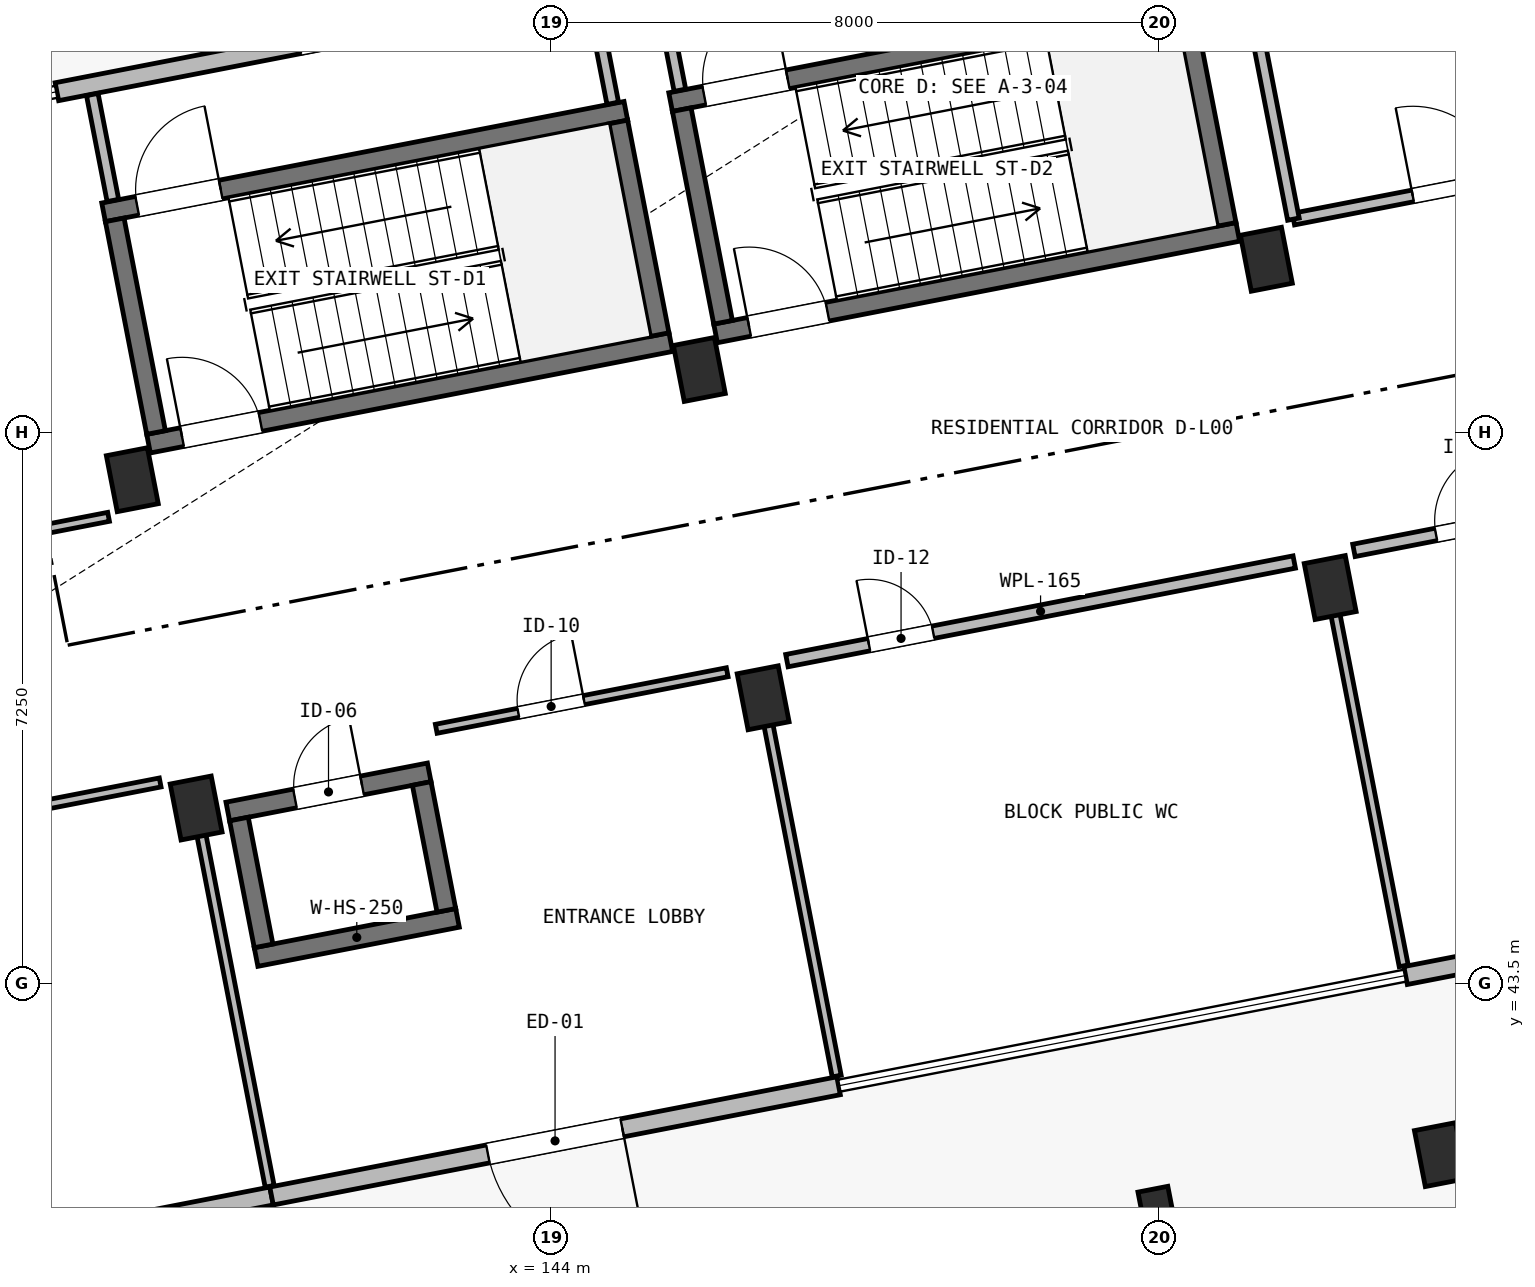
"""IFC4 building model, lengths in metres.
Left out: names, types, materials, properties, quantities, classifications, styles, units other than length and angle.
Written with IfcOpenShell. Run it as: python <this file> out.ifc"""

import sys

from ifc_helpers import new_model, si_unit, direction, frame, frame_2d, origin, origin_2d, place, context, subcontext, project, spatial, rectangle, extrude, element, fill, save


model = new_model("IFC4")
c1 = context("Model", 3, precision=1e-05, world=origin(), true_north=direction((0.0, 1.0)))
c2 = subcontext(c1, "Body", "Model", "MODEL_VIEW")
j1 = project(units=[si_unit("LENGTHUNIT", "METRE"), si_unit("PLANEANGLEUNIT", "RADIAN")], contexts=[c1])
p1 = place(None, origin())
s1 = spatial("IfcSite", under=j1, at=p1, CompositionType="ELEMENT")
p2 = place(p1, origin())
s2 = spatial("IfcBuilding", under=s1, at=p2, CompositionType="ELEMENT")
p3 = place(p2, origin())
s3 = spatial("IfcBuildingStorey", under=s2, at=p3, CompositionType="ELEMENT", Elevation=0.0)
for number, where, z_axis, x_axis in (
    (1, (139.331, 45.811, -0.35), (0.0, 0.0, 1.0), (0.982, 0.191, 0.0)),
    (2, (138.491, 50.13, -0.35), (0.0, 0.0, 1.0), (0.982, 0.191, 0.0)),
    (3, (146.791, 47.261, -0.35), (0.0, 0.0, 1.0), (0.982, 0.191, 0.0)),
    (4, (145.952, 51.58, -0.35), (0.0, 0.0, 1.0), (0.982, 0.191, 0.0)),
    (5, (155.702, 41.251, -0.35), (0.0, 0.0, 1.0), (0.982, 0.191, 0.0)),
    (6, (154.252, 48.711, -0.35), (0.0, 0.0, 1.0), (0.982, 0.191, 0.0)),
    (7, (153.412, 53.03, -0.35), (0.0, 0.0, 1.0), (0.982, 0.191, 0.0)),
):
    element("IfcColumn", number, at=place(p3, frame(where, z_axis=z_axis, x_axis=x_axis)), inside=s3, PredefinedType="COLUMN", context=c2, shape_type="SweptSolid", body=[
        extrude(rectangle(XDim=0.55, YDim=0.75, at=origin_2d()), origin(), (0.0, 0.0, 1.0), 4.85),
    ])
p4 = place(p3, frame((151.972, 40.526, -0.35), z_axis=(0.0, 0.0, 1.0), x_axis=(0.981627183448, 0.190808995377, 0.0)))
e8 = element("IfcColumn", 8, at=p4, inside=s3, PredefinedType="PILASTER", context=c2, shape_type="SweptSolid", body=[
    extrude(rectangle(XDim=0.4, YDim=0.55, at=origin_2d()), origin(), (0.0, 0.0, 1.0), 3.7),
])
p5 = place(p3, frame((138.113, 53.647, -0.35), z_axis=(0.0, 0.0, 1.0), x_axis=(0.981626097708, 0.19081458094, 0.0)))
e9 = element("IfcWall", 9, at=p5, inside=s3, PredefinedType="SHEAR", context=c2, shape_type="SweptSolid", body=[
    extrude(rectangle(XDim=7.0, YDim=0.25, at=frame_2d((3.5, 0.0))), origin(), (0.0, 0.0, 1.0), 4.85),
])
p6 = place(p5, frame((0.45, 0.0, 0.35)))
e10 = element("IfcOpeningElement", 10, at=p6, cuts=e9, PredefinedType="OPENING", context=c2, shape_type="SweptSolid", body=[
    extrude(rectangle(XDim=1.12, YDim=2.15, at=frame_2d((0.56, 1.075))), frame((0.0, 0.14, 0.0), z_axis=(0.0, -1.0, 0.0), x_axis=(1.0, 0.0, 0.0)), (0.0, 0.0, 1.0), 0.28),
])
p7 = place(p3, frame((138.705, 50.604, -0.35), z_axis=(0.0, 0.0, 1.0), x_axis=(0.981626097708, 0.19081458094, 0.0)))
e11 = element("IfcWall", 11, at=p7, inside=s3, PredefinedType="SHEAR", context=c2, shape_type="SweptSolid", body=[
    extrude(rectangle(XDim=7.0, YDim=0.25, at=frame_2d((3.5, 0.0))), origin(), (0.0, 0.0, 1.0), 4.85),
])
p8 = place(p7, frame((0.45, 0.0, 0.35)))
e12 = element("IfcOpeningElement", 12, at=p8, cuts=e11, PredefinedType="OPENING", context=c2, shape_type="SweptSolid", body=[
    extrude(rectangle(XDim=1.05, YDim=2.15, at=frame_2d((0.525, 1.075))), frame((0.0, 0.14, 0.0), z_axis=(0.0, -1.0, 0.0), x_axis=(1.0, 0.0, 0.0)), (0.0, 0.0, 1.0), 0.28),
])
p9 = place(p3, frame((138.804, 50.751, -0.35), z_axis=(0.0, 0.0, 1.0), x_axis=(-0.190858194834, 0.981617618762, 0.0)))
e13 = element("IfcWall", 13, at=p9, inside=s3, PredefinedType="SHEAR", context=c2, shape_type="SweptSolid", body=[
    extrude(rectangle(XDim=2.85, YDim=0.25, at=frame_2d((1.425, 0.0))), origin(), (0.0, 0.0, 1.0), 4.85),
])
p10 = place(p3, frame((145.43, 52.039, -0.35), z_axis=(0.0, 0.0, 1.0), x_axis=(-0.190842147128, 0.981620738819, 0.0)))
e14 = element("IfcWall", 14, at=p10, inside=s3, PredefinedType="SHEAR", context=c2, shape_type="SweptSolid", body=[
    extrude(rectangle(XDim=2.85, YDim=0.25, at=frame_2d((1.425, 0.0))), origin(), (0.0, 0.0, 1.0), 4.85),
])
p11 = place(p3, frame((145.574, 55.098, -0.35), z_axis=(0.0, 0.0, 1.0), x_axis=(0.981626097708, 0.19081458094, 0.0)))
e15 = element("IfcWall", 15, at=p11, inside=s3, PredefinedType="SHEAR", context=c2, shape_type="SweptSolid", body=[
    extrude(rectangle(XDim=7.0, YDim=0.25, at=frame_2d((3.5, 0.0))), origin(), (0.0, 0.0, 1.0), 4.85),
])
p12 = place(p11, frame((0.45, 0.0, 0.35)))
e16 = element("IfcOpeningElement", 16, at=p12, cuts=e15, PredefinedType="OPENING", context=c2, shape_type="SweptSolid", body=[
    extrude(rectangle(XDim=1.12, YDim=2.15, at=frame_2d((0.56, 1.075))), frame((0.0, 0.14, 0.0), z_axis=(0.0, -1.0, 0.0), x_axis=(1.0, 0.0, 0.0)), (0.0, 0.0, 1.0), 0.28),
])
p13 = place(p3, frame((146.165, 52.054, -0.35), z_axis=(0.0, 0.0, 1.0), x_axis=(0.981627367538, 0.190808048312, 0.0)))
e17 = element("IfcWall", 17, at=p13, inside=s3, PredefinedType="SHEAR", context=c2, shape_type="SweptSolid", body=[
    extrude(rectangle(XDim=7.0, YDim=0.25, at=frame_2d((3.5, 0.0))), origin(), (0.0, 0.0, 1.0), 4.85),
])
p14 = place(p13, frame((0.45, 0.0, 0.35)))
e18 = element("IfcOpeningElement", 18, at=p14, cuts=e17, PredefinedType="OPENING", context=c2, shape_type="SweptSolid", body=[
    extrude(rectangle(XDim=1.05, YDim=2.15, at=frame_2d((0.525, 1.075))), frame((0.0, 0.14, 0.0), z_axis=(0.0, -1.0, 0.0), x_axis=(1.0, 0.0, 0.0)), (0.0, 0.0, 1.0), 0.28),
])
for number, where, z_axis, x_axis in (
    (19, (146.264, 52.201, -0.35), (0.0, 0.0, 1.0), (-0.191, 0.982, 0.0)),
    (20, (152.89, 53.489, -0.35), (0.0, 0.0, 1.0), (-0.191, 0.982, 0.0)),
):
    element("IfcWall", number, at=place(p3, frame(where, z_axis=z_axis, x_axis=x_axis)), inside=s3, PredefinedType="SHEAR", context=c2, shape_type="SweptSolid", body=[
        extrude(rectangle(XDim=2.85, YDim=0.25, at=frame_2d((1.425, 0.0))), origin(), (0.0, 0.0, 1.0), 4.85),
    ])
p15 = place(p3, frame((140.12, 43.85, -0.35), z_axis=(0.0, 0.0, 1.0), x_axis=(0.981630445883, 0.190792210834, 0.0)))
e21 = element("IfcWall", 21, at=p15, inside=s3, PredefinedType="SHEAR", context=c2, shape_type="SweptSolid", body=[
    extrude(rectangle(XDim=2.7, YDim=0.25, at=frame_2d((1.35, 0.0))), origin(), (0.0, 0.0, 1.0), 4.85),
])
p16 = place(p3, frame((139.748, 45.764, -0.35), z_axis=(0.0, 0.0, 1.0), x_axis=(0.981630445883, 0.190792210834, 0.0)))
e22 = element("IfcWall", 22, at=p16, inside=s3, PredefinedType="SHEAR", context=c2, shape_type="SweptSolid", body=[
    extrude(rectangle(XDim=2.7, YDim=0.25, at=frame_2d((1.35, 0.0))), origin(), (0.0, 0.0, 1.0), 4.85),
])
p17 = place(p16, frame((0.9, 0.0, 0.35)))
e23 = element("IfcOpeningElement", 23, at=p17, cuts=e22, PredefinedType="OPENING", context=c2, shape_type="SweptSolid", body=[
    extrude(rectangle(XDim=0.9, YDim=2.05, at=frame_2d((0.45, 1.025))), frame((0.0, 0.14, 0.0), z_axis=(0.0, -1.0, 0.0), x_axis=(1.0, 0.0, 0.0)), (0.0, 0.0, 1.0), 0.28),
])
for number, where, z_axis, x_axis in (
    (24, (140.218, 43.997, -0.35), (0.0, 0.0, 1.0), (-0.191, 0.982, 0.0)),
    (25, (142.623, 44.464, -0.35), (0.0, 0.0, 1.0), (-0.191, 0.982, 0.0)),
):
    element("IfcWall", number, at=place(p3, frame(where, z_axis=z_axis, x_axis=x_axis)), inside=s3, PredefinedType="SHEAR", context=c2, shape_type="SweptSolid", body=[
        extrude(rectangle(XDim=1.7, YDim=0.25, at=frame_2d((0.85, 0.0))), origin(), (0.0, 0.0, 1.0), 4.85),
    ])
p18 = place(p3, frame((140.323, 40.706, 0.0), z_axis=(0.0, 0.0, 1.0), x_axis=(-0.981626422232, -0.190812911449, 0.0)))
e26 = element("IfcWall", 26, at=p18, inside=s3, PredefinedType="SOLIDWALL", context=c2, shape_type="SweptSolid", body=[
    extrude(rectangle(XDim=7.6, YDim=0.24, at=frame_2d((3.8, 0.0))), origin(), (0.0, 0.0, 1.0), 3.35),
])
p19 = place(p18, frame((3.41, 0.0, 0.55)))
e27 = element("IfcOpeningElement", 27, at=p19, cuts=e26, PredefinedType="OPENING", context=c2, shape_type="SweptSolid", body=[
    extrude(rectangle(XDim=0.78, YDim=2.2, at=frame_2d((0.39, 1.1))), frame((0.0, 0.135, 0.0), z_axis=(0.0, -1.0, 0.0), x_axis=(1.0, 0.0, 0.0)), (0.0, 0.0, 1.0), 0.27),
])
p20 = place(p3, frame((147.783, 42.156, 0.0), z_axis=(0.0, 0.0, 1.0), x_axis=(-0.981625252578, -0.19081892857, 0.0)))
e28 = element("IfcWall", 28, at=p20, inside=s3, PredefinedType="SOLIDWALL", context=c2, shape_type="SweptSolid", body=[
    extrude(rectangle(XDim=7.6, YDim=0.24, at=frame_2d((3.8, 0.0))), origin(), (0.0, 0.0, 1.0), 3.35),
])
p21 = place(p20, frame((2.9, 0.0, 0.0)))
e29 = element("IfcOpeningElement", 29, at=p21, cuts=e28, PredefinedType="OPENING", context=c2, shape_type="SweptSolid", body=[
    extrude(rectangle(XDim=1.8, YDim=2.4, at=frame_2d((0.9, 1.2))), frame((0.0, 0.135, 0.0), z_axis=(0.0, -1.0, 0.0), x_axis=(1.0, 0.0, 0.0)), (0.0, 0.0, 1.0), 0.27),
])
p22 = place(p3, frame((162.704, 45.057, 0.0), z_axis=(0.0, 0.0, 1.0), x_axis=(-0.981626422232, -0.190812911449, 0.0)))
e30 = element("IfcWall", 30, at=p22, inside=s3, PredefinedType="SOLIDWALL", context=c2, shape_type="SweptSolid", body=[
    extrude(rectangle(XDim=7.6, YDim=0.24, at=frame_2d((3.8, 0.0))), origin(), (0.0, 0.0, 1.0), 3.35),
])
p23 = place(p22, frame((3.38, 0.0, 0.55)))
e31 = element("IfcOpeningElement", 31, at=p23, cuts=e30, PredefinedType="OPENING", context=c2, shape_type="SweptSolid", body=[
    extrude(rectangle(XDim=0.84, YDim=2.28, at=frame_2d((0.42, 1.14))), frame((0.0, 0.135, 0.0), z_axis=(0.0, -1.0, 0.0), x_axis=(1.0, 0.0, 0.0)), (0.0, 0.0, 1.0), 0.27),
])
p24 = place(p3, frame((137.499, 55.234, 0.0), z_axis=(0.0, 0.0, 1.0), x_axis=(0.981625252578, 0.19081892857, 0.0)))
e32 = element("IfcWall", 32, at=p24, inside=s3, PredefinedType="SOLIDWALL", context=c2, shape_type="SweptSolid", body=[
    extrude(rectangle(XDim=7.6, YDim=0.24, at=frame_2d((3.8, 0.0))), origin(), (0.0, 0.0, 1.0), 3.35),
])
p25 = place(p24, frame((3.25, 0.0, 0.0)))
e33 = element("IfcOpeningElement", 33, at=p25, cuts=e32, PredefinedType="OPENING", context=c2, shape_type="SweptSolid", body=[
    extrude(rectangle(XDim=1.1, YDim=2.15, at=frame_2d((0.55, 1.075))), frame((0.0, 0.135, 0.0), z_axis=(0.0, -1.0, 0.0), x_axis=(1.0, 0.0, 0.0)), (0.0, 0.0, 1.0), 0.27),
])
p26 = place(p3, frame((153.768, 53.558, 0.0), z_axis=(0.0, 0.0, 1.0), x_axis=(0.981624918225, 0.190820648566, 0.0)))
e34 = element("IfcWall", 34, at=p26, inside=s3, PredefinedType="PARTITIONING", context=c2, shape_type="SweptSolid", body=[
    extrude(rectangle(XDim=4.4, YDim=0.155, at=frame_2d((2.2, 0.0))), origin(), (0.0, 0.0, 1.0), 4.22),
])
p27 = place(p26, frame((1.6, 0.0, 0.0)))
e35 = element("IfcOpeningElement", 35, at=p27, cuts=e34, PredefinedType="OPENING", context=c2, shape_type="SweptSolid", body=[
    extrude(rectangle(XDim=1.18, YDim=2.15, at=frame_2d((0.59, 1.075))), frame((0.0, 0.093, 0.0), z_axis=(0.0, -1.0, 0.0), x_axis=(1.0, 0.0, 0.0)), (0.0, 0.0, 1.0), 0.185),
])
p28 = place(p3, frame((153.768, 53.558, 0.0), z_axis=(0.0, 0.0, 1.0), x_axis=(-0.19085495634, 0.981618248425, 0.0)))
e36 = element("IfcWall", 36, at=p28, inside=s3, PredefinedType="PARTITIONING", context=c2, shape_type="SweptSolid", body=[
    extrude(rectangle(XDim=4.0, YDim=0.155, at=frame_2d((2.0, 0.0))), origin(), (0.0, 0.0, 1.0), 3.35),
])
p29 = place(p3, frame((132.183, 44.849, 0.0), z_axis=(0.0, 0.0, 1.0), x_axis=(0.981630895566, 0.190789897189, 0.0)))
e37 = element("IfcWall", 37, at=p29, inside=s3, PredefinedType="PARTITIONING", context=c2, shape_type="SweptSolid", body=[
    extrude(rectangle(XDim=6.8, YDim=0.12, at=frame_2d((3.4, 0.0))), origin(), (0.0, 0.0, 1.0), 4.22),
])
p30 = place(p29, frame((1.1, 0.0, 0.0)))
e38 = element("IfcOpeningElement", 38, at=p30, cuts=e37, PredefinedType="OPENING", context=c2, shape_type="SweptSolid", body=[
    extrude(rectangle(XDim=0.9, YDim=2.1, at=frame_2d((0.45, 1.05))), frame((0.0, 0.075, 0.0), z_axis=(0.0, -1.0, 0.0), x_axis=(1.0, 0.0, 0.0)), (0.0, 0.0, 1.0), 0.15),
])
p31 = place(p3, frame((142.49, 46.853, 0.0), z_axis=(0.0, 0.0, 1.0), x_axis=(0.981628093632, 0.190804312824, 0.0)))
e39 = element("IfcWall", 39, at=p31, inside=s3, PredefinedType="PARTITIONING", context=c2, shape_type="SweptSolid", body=[
    extrude(rectangle(XDim=3.9, YDim=0.12, at=frame_2d((1.95, 0.0))), origin(), (0.0, 0.0, 1.0), 4.22),
])
p32 = place(p31, frame((1.1, 0.0, 0.0)))
e40 = element("IfcOpeningElement", 40, at=p32, cuts=e39, PredefinedType="OPENING", context=c2, shape_type="SweptSolid", body=[
    extrude(rectangle(XDim=0.88, YDim=2.1, at=frame_2d((0.44, 1.05))), frame((0.0, 0.075, 0.0), z_axis=(0.0, -1.0, 0.0), x_axis=(1.0, 0.0, 0.0)), (0.0, 0.0, 1.0), 0.15),
])
p33 = place(p3, frame((140.298, 40.834, 0.0), z_axis=(0.0, 0.0, 1.0), x_axis=(-0.190833814627, 0.981622358748, 0.0)))
e41 = element("IfcWall", 41, at=p33, inside=s3, PredefinedType="PARTITIONING", context=c2, shape_type="SweptSolid", body=[
    extrude(rectangle(XDim=4.74, YDim=0.12, at=frame_2d((2.37, 0.0))), origin(), (0.0, 0.0, 1.0), 3.32),
])
p34 = place(p3, frame((147.104, 47.75, 0.0), z_axis=(0.0, 0.0, 1.0), x_axis=(0.981624170853, 0.190824493182, 0.0)))
e42 = element("IfcWall", 42, at=p34, inside=s3, PredefinedType="PLUMBINGWALL", context=c2, shape_type="SweptSolid", body=[
    extrude(rectangle(XDim=6.8, YDim=0.165, at=frame_2d((3.4, 0.0))), origin(), (0.0, 0.0, 1.0), 4.22),
])
p35 = place(p34, frame((1.1, 0.0, 0.0)))
e43 = element("IfcOpeningElement", 43, at=p35, cuts=e42, PredefinedType="OPENING", context=c2, shape_type="SweptSolid", body=[
    extrude(rectangle(XDim=0.86, YDim=2.1, at=frame_2d((0.43, 1.05))), frame((0.0, 0.097, 0.0), z_axis=(0.0, -1.0, 0.0), x_axis=(1.0, 0.0, 0.0)), (0.0, 0.0, 1.0), 0.195),
])
p36 = place(p3, frame((147.759, 42.284, 0.0), z_axis=(0.0, 0.0, 1.0), x_axis=(-0.190833814627, 0.981622358748, 0.0)))
e44 = element("IfcWall", 44, at=p36, inside=s3, PredefinedType="PARTITIONING", context=c2, shape_type="SweptSolid", body=[
    extrude(rectangle(XDim=4.74, YDim=0.12, at=frame_2d((2.37, 0.0))), origin(), (0.0, 0.0, 1.0), 3.32),
])
p37 = place(p3, frame((154.564, 49.2, 0.0), z_axis=(0.0, 0.0, 1.0), x_axis=(0.981628356687, 0.190802959485, 0.0)))
e45 = element("IfcWall", 45, at=p37, inside=s3, PredefinedType="PLUMBINGWALL", context=c2, shape_type="SweptSolid", body=[
    extrude(rectangle(XDim=7.25, YDim=0.165, at=frame_2d((3.625, 0.0))), origin(), (0.0, 0.0, 1.0), 4.22),
])
p38 = place(p37, frame((1.1, 0.0, 0.0)))
e46 = element("IfcOpeningElement", 46, at=p38, cuts=e45, PredefinedType="OPENING", context=c2, shape_type="SweptSolid", body=[
    extrude(rectangle(XDim=0.96, YDim=2.12, at=frame_2d((0.48, 1.06))), frame((0.0, 0.097, 0.0), z_axis=(0.0, -1.0, 0.0), x_axis=(1.0, 0.0, 0.0)), (0.0, 0.0, 1.0), 0.195),
])
p39 = place(p3, frame((155.219, 43.734, 0.0), z_axis=(0.0, 0.0, 1.0), x_axis=(-0.190784182555, 0.981632006246, 0.0)))
e47 = element("IfcWall", 47, at=p39, inside=s3, PredefinedType="PARTITIONING", context=c2, shape_type="SweptSolid", body=[
    extrude(rectangle(XDim=4.74, YDim=0.12, at=frame_2d((2.37, 0.0))), origin(), (0.0, 0.0, 1.0), 3.32),
])
p40 = place(p3, frame((131.504, 48.344, 0.0), z_axis=(0.0, 0.0, 1.0), x_axis=(0.981624170853, 0.190824493182, 0.0)))
e48 = element("IfcWall", 48, at=p40, inside=s3, PredefinedType="PARTITIONING", context=c2, shape_type="SweptSolid", body=[
    extrude(rectangle(XDim=6.8, YDim=0.12, at=frame_2d((3.4, 0.0))), origin(), (0.0, 0.0, 1.0), 4.22),
])
p41 = place(p40, frame((1.8, 0.0, 0.0)))
e49 = element("IfcOpeningElement", 49, at=p41, cuts=e48, PredefinedType="OPENING", context=c2, shape_type="SweptSolid", body=[
    extrude(rectangle(XDim=0.88, YDim=2.1, at=frame_2d((0.44, 1.05))), frame((0.0, 0.075, 0.0), z_axis=(0.0, -1.0, 0.0), x_axis=(1.0, 0.0, 0.0)), (0.0, 0.0, 1.0), 0.15),
])
p42 = place(p3, frame((138.236, 53.804, 0.0), z_axis=(0.0, 0.0, 1.0), x_axis=(-0.190690165368, 0.981650274197, 0.0)))
e50 = element("IfcWall", 50, at=p42, inside=s3, PredefinedType="PARTITIONING", context=c2, shape_type="SweptSolid", body=[
    extrude(rectangle(XDim=1.42, YDim=0.155, at=frame_2d((0.71, 0.0))), origin(), (0.0, 0.0, 1.0), 3.35),
])
p43 = place(p3, frame((144.812, 55.082, 0.0), z_axis=(0.0, 0.0, 1.0), x_axis=(-0.190657983598, 0.98165652511, 0.0)))
e51 = element("IfcWall", 51, at=p43, inside=s3, PredefinedType="PARTITIONING", context=c2, shape_type="SweptSolid", body=[
    extrude(rectangle(XDim=1.42, YDim=0.155, at=frame_2d((0.71, 0.0))), origin(), (0.0, 0.0, 1.0), 3.35),
])
p44 = place(p3, frame((145.696, 55.254, 0.0), z_axis=(0.0, 0.0, 1.0), x_axis=(-0.190855852571, 0.981618074171, 0.0)))
e52 = element("IfcWall", 52, at=p44, inside=s3, PredefinedType="PARTITIONING", context=c2, shape_type="SweptSolid", body=[
    extrude(rectangle(XDim=1.42, YDim=0.155, at=frame_2d((0.71, 0.0))), origin(), (0.0, 0.0, 1.0), 3.35),
])
p45 = place(p21, origin())
e53 = element("IfcDoor", 53, at=p45, inside=s3, OperationType="DOUBLE_DOOR_SINGLE_SWING", PredefinedType="DOOR", context=c2, shape_type="SweptSolid", body=[
    extrude(rectangle(XDim=1.8, YDim=2.4, at=frame_2d((0.9, 1.2))), frame((0.0, 0.025, 0.0), z_axis=(0.0, -1.0, 0.0), x_axis=(1.0, 0.0, 0.0)), (0.0, 0.0, 1.0), 0.05),
])
fill(e29, e53)
p46 = place(p27, origin())
e54 = element("IfcDoor", 54, at=p46, inside=s3, OperationType="SINGLE_SWING_LEFT", PredefinedType="DOOR", context=c2, shape_type="SweptSolid", body=[
    extrude(rectangle(XDim=1.18, YDim=2.15, at=frame_2d((0.59, 1.075))), frame((0.0, 0.025, 0.0), z_axis=(0.0, -1.0, 0.0), x_axis=(1.0, 0.0, 0.0)), (0.0, 0.0, 1.0), 0.05),
])
fill(e35, e54)
p47 = place(p32, origin())
e55 = element("IfcDoor", 55, at=p47, inside=s3, OperationType="SINGLE_SWING_RIGHT", PredefinedType="DOOR", context=c2, shape_type="SweptSolid", body=[
    extrude(rectangle(XDim=0.88, YDim=2.1, at=frame_2d((0.44, 1.05))), frame((0.0, 0.025, 0.0), z_axis=(0.0, -1.0, 0.0), x_axis=(1.0, 0.0, 0.0)), (0.0, 0.0, 1.0), 0.05),
])
fill(e40, e55)
p48 = place(p35, origin())
e56 = element("IfcDoor", 56, at=p48, inside=s3, OperationType="SINGLE_SWING_LEFT", PredefinedType="DOOR", context=c2, shape_type="SweptSolid", body=[
    extrude(rectangle(XDim=0.86, YDim=2.1, at=frame_2d((0.43, 1.05))), frame((0.0, 0.025, 0.0), z_axis=(0.0, -1.0, 0.0), x_axis=(1.0, 0.0, 0.0)), (0.0, 0.0, 1.0), 0.05),
])
fill(e43, e56)
p49 = place(p38, origin())
e57 = element("IfcDoor", 57, at=p49, inside=s3, OperationType="SINGLE_SWING_RIGHT", PredefinedType="DOOR", context=c2, shape_type="SweptSolid", body=[
    extrude(rectangle(XDim=0.96, YDim=2.12, at=frame_2d((0.48, 1.06))), frame((0.0, 0.025, 0.0), z_axis=(0.0, -1.0, 0.0), x_axis=(1.0, 0.0, 0.0)), (0.0, 0.0, 1.0), 0.05),
])
fill(e46, e57)
p50 = place(p8, origin())
e58 = element("IfcDoor", 58, at=p50, inside=s3, OperationType="SINGLE_SWING_LEFT", PredefinedType="DOOR", context=c2, shape_type="SweptSolid", body=[
    extrude(rectangle(XDim=1.05, YDim=2.15, at=frame_2d((0.525, 1.075))), frame((0.0, 0.025, 0.0), z_axis=(0.0, -1.0, 0.0), x_axis=(1.0, 0.0, 0.0)), (0.0, 0.0, 1.0), 0.05),
])
fill(e12, e58)
p51 = place(p6, origin())
e59 = element("IfcDoor", 59, at=p51, inside=s3, OperationType="SINGLE_SWING_RIGHT", PredefinedType="DOOR", context=c2, shape_type="SweptSolid", body=[
    extrude(rectangle(XDim=1.12, YDim=2.15, at=frame_2d((0.56, 1.075))), frame((0.0, 0.025, 0.0), z_axis=(0.0, -1.0, 0.0), x_axis=(1.0, 0.0, 0.0)), (0.0, 0.0, 1.0), 0.05),
])
fill(e10, e59)
p52 = place(p14, origin())
e60 = element("IfcDoor", 60, at=p52, inside=s3, OperationType="SINGLE_SWING_LEFT", PredefinedType="DOOR", context=c2, shape_type="SweptSolid", body=[
    extrude(rectangle(XDim=1.05, YDim=2.15, at=frame_2d((0.525, 1.075))), frame((0.0, 0.025, 0.0), z_axis=(0.0, -1.0, 0.0), x_axis=(1.0, 0.0, 0.0)), (0.0, 0.0, 1.0), 0.05),
])
fill(e18, e60)
p53 = place(p12, origin())
e61 = element("IfcDoor", 61, at=p53, inside=s3, OperationType="SINGLE_SWING_RIGHT", PredefinedType="DOOR", context=c2, shape_type="SweptSolid", body=[
    extrude(rectangle(XDim=1.12, YDim=2.15, at=frame_2d((0.56, 1.075))), frame((0.0, 0.025, 0.0), z_axis=(0.0, -1.0, 0.0), x_axis=(1.0, 0.0, 0.0)), (0.0, 0.0, 1.0), 0.05),
])
fill(e16, e61)
p54 = place(p17, origin())
e62 = element("IfcDoor", 62, at=p54, inside=s3, OperationType="SINGLE_SWING_RIGHT", PredefinedType="DOOR", context=c2, shape_type="SweptSolid", body=[
    extrude(rectangle(XDim=0.9, YDim=2.05, at=frame_2d((0.45, 1.025))), frame((0.0, 0.025, 0.0), z_axis=(0.0, -1.0, 0.0), x_axis=(1.0, 0.0, 0.0)), (0.0, 0.0, 1.0), 0.05),
])
fill(e23, e62)
save(model, sys.argv[1])
